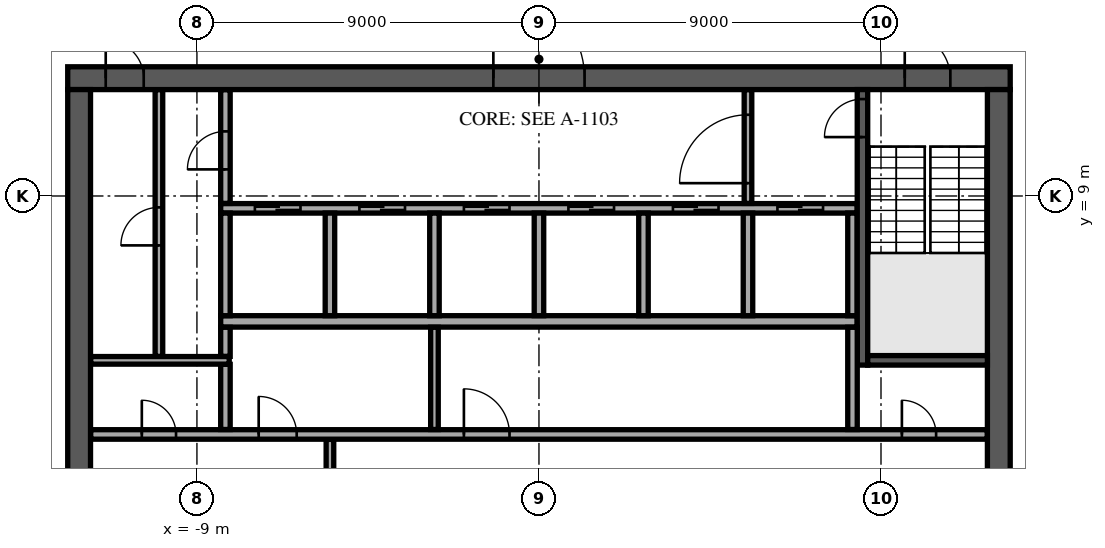
"""IFC4 building model, lengths in metres.
Left out: names, types, materials, properties, quantities, classifications, styles, units other than length and angle.
Written with IfcOpenShell. Run it as: python <this file> out.ifc"""

import sys

from ifc_helpers import new_model, si_unit, direction, frame, frame_2d, origin, place, context, subcontext, project, spatial, rectangle, extrude, element, fill, save


model = new_model("IFC4")
c1 = context("Model", 3, precision=1e-05, world=origin(), true_north=direction((0.0, 1.0)))
c2 = subcontext(c1, "Body", "Model", "MODEL_VIEW")
j1 = project(units=[si_unit("LENGTHUNIT", "METRE"), si_unit("PLANEANGLEUNIT", "RADIAN")], contexts=[c1])
p1 = place(None, origin())
s1 = spatial("IfcSite", under=j1, at=p1, CompositionType="ELEMENT")
p2 = place(p1, origin())
s2 = spatial("IfcBuilding", under=s1, at=p2, CompositionType="ELEMENT")
p3 = place(p2, frame((0.0, 0.0, 300.5)))
s3 = spatial("IfcBuildingStorey", under=s2, at=p3, CompositionType="ELEMENT", Elevation=300.5)
p4 = place(p3, frame((-12.4, 12.1, 0.0), z_axis=(0.0, 0.0, 1.0), x_axis=(1.0, 0.0, 0.0)))
e1 = element("IfcWall", 1, at=p4, inside=s3, PredefinedType="SHEAR", context=c2, shape_type="SweptSolid", body=[
    extrude(rectangle(XDim=24.8, YDim=0.6, at=frame_2d((12.4, 0.0))), origin(), (0.0, 0.0, 1.0), 3.65),
])
p5 = place(p4, frame((11.2, 0.0, 0.0)))
e2 = element("IfcOpeningElement", 2, at=p5, cuts=e1, PredefinedType="OPENING", context=c2, shape_type="SweptSolid", body=[
    extrude(rectangle(XDim=2.4, YDim=2.4, at=frame_2d((1.2, 1.2))), frame((0.0, 0.31, 0.0), z_axis=(0.0, -1.0, 0.0), x_axis=(1.0, 0.0, 0.0)), (0.0, 0.0, 1.0), 0.62),
])
p6 = place(p4, frame((22.025, 0.0, 0.0)))
e3 = element("IfcOpeningElement", 3, at=p6, cuts=e1, PredefinedType="OPENING", context=c2, shape_type="SweptSolid", body=[
    extrude(rectangle(XDim=1.2, YDim=2.1, at=frame_2d((0.6, 1.05))), frame((0.0, 0.31, 0.0), z_axis=(0.0, -1.0, 0.0), x_axis=(1.0, 0.0, 0.0)), (0.0, 0.0, 1.0), 0.62),
])
p7 = place(p4, frame((1.0, 0.0, 0.0)))
e4 = element("IfcOpeningElement", 4, at=p7, cuts=e1, PredefinedType="OPENING", context=c2, shape_type="SweptSolid", body=[
    extrude(rectangle(XDim=1.0, YDim=2.1, at=frame_2d((0.5, 1.05))), frame((0.0, 0.31, 0.0), z_axis=(0.0, -1.0, 0.0), x_axis=(1.0, 0.0, 0.0)), (0.0, 0.0, 1.0), 0.62),
])
p8 = place(p3, frame((12.1, -11.8, 0.0), z_axis=(0.0, 0.0, 1.0), x_axis=(0.0, 1.0, 0.0)))
e5 = element("IfcWall", 5, at=p8, inside=s3, PredefinedType="SHEAR", context=c2, shape_type="SweptSolid", body=[
    extrude(rectangle(XDim=23.6, YDim=0.6, at=frame_2d((11.8, 0.0))), origin(), (0.0, 0.0, 1.0), 3.65),
])
p9 = place(p8, frame((10.6, 0.0, 0.0)))
e6 = element("IfcOpeningElement", 6, at=p9, cuts=e5, PredefinedType="OPENING", context=c2, shape_type="SweptSolid", body=[
    extrude(rectangle(XDim=2.4, YDim=2.4, at=frame_2d((1.2, 1.2))), frame((0.0, 0.31, 0.0), z_axis=(0.0, -1.0, 0.0), x_axis=(1.0, 0.0, 0.0)), (0.0, 0.0, 1.0), 0.62),
])
p10 = place(p3, frame((-12.1, -11.8, 0.0), z_axis=(0.0, 0.0, 1.0), x_axis=(0.0, 1.0, 0.0)))
e7 = element("IfcWall", 7, at=p10, inside=s3, PredefinedType="SHEAR", context=c2, shape_type="SweptSolid", body=[
    extrude(rectangle(XDim=23.6, YDim=0.6, at=frame_2d((11.8, 0.0))), origin(), (0.0, 0.0, 1.0), 3.65),
])
p11 = place(p10, frame((10.6, 0.0, 0.0)))
e8 = element("IfcOpeningElement", 8, at=p11, cuts=e7, PredefinedType="OPENING", context=c2, shape_type="SweptSolid", body=[
    extrude(rectangle(XDim=2.4, YDim=2.4, at=frame_2d((1.2, 1.2))), frame((0.0, 0.31, 0.0), z_axis=(0.0, -1.0, 0.0), x_axis=(1.0, 0.0, 0.0)), (0.0, 0.0, 1.0), 0.62),
])
p12 = place(p3, frame((-8.375, 5.7, 0.0), z_axis=(0.0, 0.0, 1.0), x_axis=(1.0, 0.0, 0.0)))
e9 = element("IfcWall", 9, at=p12, inside=s3, PredefinedType="SOLIDWALL", context=c2, shape_type="SweptSolid", body=[
    extrude(rectangle(XDim=16.75, YDim=0.3, at=frame_2d((8.375, 0.0))), origin(), (0.0, 0.0, 1.0), 3.65),
])
p13 = place(p3, frame((-8.375, 8.675, 0.0), z_axis=(0.0, 0.0, 1.0), x_axis=(1.0, 0.0, 0.0)))
e10 = element("IfcWall", 10, at=p13, inside=s3, PredefinedType="SOLIDWALL", context=c2, shape_type="SweptSolid", body=[
    extrude(rectangle(XDim=16.75, YDim=0.25, at=frame_2d((8.375, 0.0))), origin(), (0.0, 0.0, 1.0), 3.65),
])
p14 = place(p13, frame((0.9, 0.0, 0.0)))
e11 = element("IfcOpeningElement", 11, at=p14, cuts=e10, PredefinedType="OPENING", context=c2, shape_type="SweptSolid", body=[
    extrude(rectangle(XDim=1.2, YDim=2.1, at=frame_2d((0.6, 1.05))), frame((0.0, 0.135, 0.0), z_axis=(0.0, -1.0, 0.0), x_axis=(1.0, 0.0, 0.0)), (0.0, 0.0, 1.0), 0.27),
])
p15 = place(p13, frame((3.65, 0.0, 0.0)))
e12 = element("IfcOpeningElement", 12, at=p15, cuts=e10, PredefinedType="OPENING", context=c2, shape_type="SweptSolid", body=[
    extrude(rectangle(XDim=1.2, YDim=2.1, at=frame_2d((0.6, 1.05))), frame((0.0, 0.135, 0.0), z_axis=(0.0, -1.0, 0.0), x_axis=(1.0, 0.0, 0.0)), (0.0, 0.0, 1.0), 0.27),
])
p16 = place(p13, frame((6.4, 0.0, 0.0)))
e13 = element("IfcOpeningElement", 13, at=p16, cuts=e10, PredefinedType="OPENING", context=c2, shape_type="SweptSolid", body=[
    extrude(rectangle(XDim=1.2, YDim=2.1, at=frame_2d((0.6, 1.05))), frame((0.0, 0.135, 0.0), z_axis=(0.0, -1.0, 0.0), x_axis=(1.0, 0.0, 0.0)), (0.0, 0.0, 1.0), 0.27),
])
p17 = place(p13, frame((9.15, 0.0, 0.0)))
e14 = element("IfcOpeningElement", 14, at=p17, cuts=e10, PredefinedType="OPENING", context=c2, shape_type="SweptSolid", body=[
    extrude(rectangle(XDim=1.2, YDim=2.1, at=frame_2d((0.6, 1.05))), frame((0.0, 0.135, 0.0), z_axis=(0.0, -1.0, 0.0), x_axis=(1.0, 0.0, 0.0)), (0.0, 0.0, 1.0), 0.27),
])
p18 = place(p13, frame((11.9, 0.0, 0.0)))
e15 = element("IfcOpeningElement", 15, at=p18, cuts=e10, PredefinedType="OPENING", context=c2, shape_type="SweptSolid", body=[
    extrude(rectangle(XDim=1.2, YDim=2.1, at=frame_2d((0.6, 1.05))), frame((0.0, 0.135, 0.0), z_axis=(0.0, -1.0, 0.0), x_axis=(1.0, 0.0, 0.0)), (0.0, 0.0, 1.0), 0.27),
])
p19 = place(p13, frame((14.65, 0.0, 0.0)))
e16 = element("IfcOpeningElement", 16, at=p19, cuts=e10, PredefinedType="OPENING", context=c2, shape_type="SweptSolid", body=[
    extrude(rectangle(XDim=1.2, YDim=2.1, at=frame_2d((0.6, 1.05))), frame((0.0, 0.135, 0.0), z_axis=(0.0, -1.0, 0.0), x_axis=(1.0, 0.0, 0.0)), (0.0, 0.0, 1.0), 0.27),
])
for number, where, z_axis, x_axis in (
    (17, (-8.25, 5.85, 0.0), (0.0, 0.0, 1.0), (0.0, 1.0, 0.0)),
    (18, (-5.5, 5.85, 0.0), (0.0, 0.0, 1.0), (0.0, 1.0, 0.0)),
    (19, (-2.75, 5.85, 0.0), (0.0, 0.0, 1.0), (0.0, 1.0, 0.0)),
    (20, (0.0, 5.85, 0.0), (0.0, 0.0, 1.0), (0.0, 1.0, 0.0)),
    (21, (2.75, 5.85, 0.0), (0.0, 0.0, 1.0), (0.0, 1.0, 0.0)),
    (22, (5.5, 5.85, 0.0), (0.0, 0.0, 1.0), (0.0, 1.0, 0.0)),
    (23, (8.25, 5.85, 0.0), (0.0, 0.0, 1.0), (0.0, 1.0, 0.0)),
):
    element("IfcWall", number, at=place(p3, frame(where, z_axis=z_axis, x_axis=x_axis)), inside=s3, PredefinedType="SOLIDWALL", context=c2, shape_type="SweptSolid", body=[
        extrude(rectangle(XDim=2.7, YDim=0.25, at=frame_2d((1.35, 0.0))), origin(), (0.0, 0.0, 1.0), 3.65),
    ])
p20 = place(p3, frame((8.512, 4.55, 0.0), z_axis=(0.0, 0.0, 1.0), x_axis=(0.0, 1.0, 0.0)))
e24 = element("IfcWall", 24, at=p20, inside=s3, PredefinedType="SOLIDWALL", context=c2, shape_type="SweptSolid", body=[
    extrude(rectangle(XDim=7.25, YDim=0.275, at=frame_2d((3.625, 0.0))), origin(), (0.0, 0.0, 1.0), 3.65),
])
p21 = place(p20, frame((6.0, 0.0, 0.0)))
e25 = element("IfcOpeningElement", 25, at=p21, cuts=e24, PredefinedType="OPENING", context=c2, shape_type="SweptSolid", body=[
    extrude(rectangle(XDim=1.0, YDim=2.1, at=frame_2d((0.5, 1.05))), frame((0.0, 0.147, 0.0), z_axis=(0.0, -1.0, 0.0), x_axis=(1.0, 0.0, 0.0)), (0.0, 0.0, 1.0), 0.295),
])
p22 = place(p3, frame((8.65, 4.675, 0.0), z_axis=(0.0, 0.0, 1.0), x_axis=(1.0, 0.0, 0.0)))
e26 = element("IfcWall", 26, at=p22, inside=s3, PredefinedType="SOLIDWALL", context=c2, shape_type="SweptSolid", body=[
    extrude(rectangle(XDim=3.15, YDim=0.25, at=frame_2d((1.575, 0.0))), origin(), (0.0, 0.0, 1.0), 3.65),
])
p23 = place(p3, frame((-5.5, -2.595, 0.0), z_axis=(0.0, 0.0, 1.0), x_axis=(0.0, 1.0, 0.0)))
e27 = element("IfcWall", 27, at=p23, inside=s3, PredefinedType="PARTITIONING", context=c2, shape_type="SweptSolid", body=[
    extrude(rectangle(XDim=5.19, YDim=0.2, at=frame_2d((2.595, 0.0))), origin(), (0.0, 0.0, 1.0), 3.65),
])
p24 = place(p23, frame((1.395, 0.0, 0.0)))
e28 = element("IfcOpeningElement", 28, at=p24, cuts=e27, PredefinedType="OPENING", context=c2, shape_type="SweptSolid", body=[
    extrude(rectangle(XDim=2.4, YDim=2.4, at=frame_2d((1.2, 1.2))), frame((0.0, 0.11, 0.0), z_axis=(0.0, -1.0, 0.0), x_axis=(1.0, 0.0, 0.0)), (0.0, 0.0, 1.0), 0.22),
])
p25 = place(p3, frame((-11.795, 2.725, 0.0), z_axis=(0.0, 0.0, 1.0), x_axis=(1.0, 0.0, 0.0)))
e29 = element("IfcWall", 29, at=p25, inside=s3, PredefinedType="PARTITIONING", context=c2, shape_type="SweptSolid", body=[
    extrude(rectangle(XDim=23.59, YDim=0.25, at=frame_2d((11.795, 0.0))), origin(), (0.0, 0.0, 1.0), 3.65),
])
p26 = place(p25, frame((21.345, 0.0, 0.0)))
e30 = element("IfcOpeningElement", 30, at=p26, cuts=e29, PredefinedType="OPENING", context=c2, shape_type="SweptSolid", body=[
    extrude(rectangle(XDim=0.9, YDim=2.1, at=frame_2d((0.45, 1.05))), frame((0.0, 0.135, 0.0), z_axis=(0.0, -1.0, 0.0), x_axis=(1.0, 0.0, 0.0)), (0.0, 0.0, 1.0), 0.27),
])
p27 = place(p25, frame((1.345, 0.0, 0.0)))
e31 = element("IfcOpeningElement", 31, at=p27, cuts=e29, PredefinedType="OPENING", context=c2, shape_type="SweptSolid", body=[
    extrude(rectangle(XDim=0.9, YDim=2.1, at=frame_2d((0.45, 1.05))), frame((0.0, 0.135, 0.0), z_axis=(0.0, -1.0, 0.0), x_axis=(1.0, 0.0, 0.0)), (0.0, 0.0, 1.0), 0.27),
])
p28 = place(p25, frame((4.42, 0.0, 0.0)))
e32 = element("IfcOpeningElement", 32, at=p28, cuts=e29, PredefinedType="OPENING", context=c2, shape_type="SweptSolid", body=[
    extrude(rectangle(XDim=1.0, YDim=2.1, at=frame_2d((0.5, 1.05))), frame((0.0, 0.135, 0.0), z_axis=(0.0, -1.0, 0.0), x_axis=(1.0, 0.0, 0.0)), (0.0, 0.0, 1.0), 0.27),
])
p29 = place(p25, frame((9.82, 0.0, 0.0)))
e33 = element("IfcOpeningElement", 33, at=p29, cuts=e29, PredefinedType="OPENING", context=c2, shape_type="SweptSolid", body=[
    extrude(rectangle(XDim=1.2, YDim=2.1, at=frame_2d((0.6, 1.05))), frame((0.0, 0.135, 0.0), z_axis=(0.0, -1.0, 0.0), x_axis=(1.0, 0.0, 0.0)), (0.0, 0.0, 1.0), 0.27),
])
p30 = place(p3, frame((-8.25, 2.855, 0.0), z_axis=(0.0, 0.0, 1.0), x_axis=(0.0, 1.0, 0.0)))
e34 = element("IfcWall", 34, at=p30, inside=s3, PredefinedType="PARTITIONING", context=c2, shape_type="SweptSolid", body=[
    extrude(rectangle(XDim=1.715, YDim=0.25, at=frame_2d((0.857, 0.0))), origin(), (0.0, 0.0, 1.0), 3.65),
])
p31 = place(p3, frame((-2.75, 2.855, 0.0), z_axis=(0.0, 0.0, 1.0), x_axis=(0.0, 1.0, 0.0)))
e35 = element("IfcWall", 35, at=p31, inside=s3, PredefinedType="PARTITIONING", context=c2, shape_type="SweptSolid", body=[
    extrude(rectangle(XDim=2.69, YDim=0.2, at=frame_2d((1.345, 0.0))), origin(), (0.0, 0.0, 1.0), 3.65),
])
p32 = place(p3, frame((8.25, 2.855, 0.0), z_axis=(0.0, 0.0, 1.0), x_axis=(0.0, 1.0, 0.0)))
e36 = element("IfcWall", 36, at=p32, inside=s3, PredefinedType="PARTITIONING", context=c2, shape_type="SweptSolid", body=[
    extrude(rectangle(XDim=2.69, YDim=0.25, at=frame_2d((1.345, 0.0))), origin(), (0.0, 0.0, 1.0), 3.65),
])
p33 = place(p3, frame((-11.795, 4.675, 0.0), z_axis=(0.0, 0.0, 1.0), x_axis=(1.0, 0.0, 0.0)))
e37 = element("IfcWall", 37, at=p33, inside=s3, PredefinedType="PARTITIONING", context=c2, shape_type="SweptSolid", body=[
    extrude(rectangle(XDim=3.645, YDim=0.2, at=frame_2d((1.823, 0.0))), origin(), (0.0, 0.0, 1.0), 3.65),
])
p34 = place(p3, frame((-10.0, 4.78, 0.0), z_axis=(0.0, 0.0, 1.0), x_axis=(0.0, 1.0, 0.0)))
e38 = element("IfcWall", 38, at=p34, inside=s3, PredefinedType="PARTITIONING", context=c2, shape_type="SweptSolid", body=[
    extrude(rectangle(XDim=7.015, YDim=0.2, at=frame_2d((3.507, 0.0))), origin(), (0.0, 0.0, 1.0), 3.65),
])
p35 = place(p34, frame((2.92, 0.0, 0.0)))
e39 = element("IfcOpeningElement", 39, at=p35, cuts=e38, PredefinedType="OPENING", context=c2, shape_type="SweptSolid", body=[
    extrude(rectangle(XDim=1.0, YDim=2.1, at=frame_2d((0.5, 1.05))), frame((0.0, 0.11, 0.0), z_axis=(0.0, -1.0, 0.0), x_axis=(1.0, 0.0, 0.0)), (0.0, 0.0, 1.0), 0.22),
])
p36 = place(p3, frame((-8.25, 4.78, 0.0), z_axis=(0.0, 0.0, 1.0), x_axis=(0.0, 1.0, 0.0)))
e40 = element("IfcWall", 40, at=p36, inside=s3, PredefinedType="PARTITIONING", context=c2, shape_type="SweptSolid", body=[
    extrude(rectangle(XDim=0.765, YDim=0.25, at=frame_2d((0.382, 0.0))), origin(), (0.0, 0.0, 1.0), 3.65),
])
p37 = place(p3, frame((-8.25, 8.805, 0.0), z_axis=(0.0, 0.0, 1.0), x_axis=(0.0, 1.0, 0.0)))
e41 = element("IfcWall", 41, at=p37, inside=s3, PredefinedType="PARTITIONING", context=c2, shape_type="SweptSolid", body=[
    extrude(rectangle(XDim=2.99, YDim=0.25, at=frame_2d((1.495, 0.0))), origin(), (0.0, 0.0, 1.0), 3.65),
])
p38 = place(p37, frame((0.895, 0.0, 0.0)))
e42 = element("IfcOpeningElement", 42, at=p38, cuts=e41, PredefinedType="OPENING", context=c2, shape_type="SweptSolid", body=[
    extrude(rectangle(XDim=1.0, YDim=2.1, at=frame_2d((0.5, 1.05))), frame((0.0, 0.135, 0.0), z_axis=(0.0, -1.0, 0.0), x_axis=(1.0, 0.0, 0.0)), (0.0, 0.0, 1.0), 0.27),
])
p39 = place(p3, frame((5.5, 8.805, 0.0), z_axis=(0.0, 0.0, 1.0), x_axis=(0.0, 1.0, 0.0)))
e43 = element("IfcWall", 43, at=p39, inside=s3, PredefinedType="PARTITIONING", context=c2, shape_type="SweptSolid", body=[
    extrude(rectangle(XDim=2.99, YDim=0.2, at=frame_2d((1.495, 0.0))), origin(), (0.0, 0.0, 1.0), 3.65),
])
p40 = place(p39, frame((0.532, 0.0, 0.0)))
e44 = element("IfcOpeningElement", 44, at=p40, cuts=e43, PredefinedType="OPENING", context=c2, shape_type="SweptSolid", body=[
    extrude(rectangle(XDim=1.8, YDim=2.1, at=frame_2d((0.9, 1.05))), frame((0.0, 0.11, 0.0), z_axis=(0.0, -1.0, 0.0), x_axis=(1.0, 0.0, 0.0)), (0.0, 0.0, 1.0), 0.22),
])
p41 = place(p3, frame((-8.176, 25.325, 0.0), z_axis=(0.0, 0.0, 1.0), x_axis=(0.920507643781, -0.390724554821, 0.0)))
e45 = element("IfcWall", 45, at=p41, inside=s3, PredefinedType="PARTITIONING", context=c2, shape_type="SweptSolid", body=[
    extrude(rectangle(XDim=34.917, YDim=0.15, at=frame_2d((17.458, 0.0))), origin(), (0.0, 0.0, 1.0), 3.25),
])
p42 = place(p41, frame((5.55, 0.0, 0.0)))
e46 = element("IfcOpeningElement", 46, at=p42, cuts=e45, PredefinedType="OPENING", context=c2, shape_type="SweptSolid", body=[
    extrude(rectangle(XDim=1.8, YDim=2.1, at=frame_2d((0.9, 1.05))), frame((0.0, 0.085, 0.0), z_axis=(0.0, -1.0, 0.0), x_axis=(1.0, 0.0, 0.0)), (0.0, 0.0, 1.0), 0.17),
])
p43 = place(p41, frame((1.05, 0.0, 0.0)))
e47 = element("IfcOpeningElement", 47, at=p43, cuts=e45, PredefinedType="OPENING", context=c2, shape_type="SweptSolid", body=[
    extrude(rectangle(XDim=1.0, YDim=2.1, at=frame_2d((0.5, 1.05))), frame((0.0, 0.085, 0.0), z_axis=(0.0, -1.0, 0.0), x_axis=(1.0, 0.0, 0.0)), (0.0, 0.0, 1.0), 0.17),
])
p44 = place(p41, frame((16.098, 0.0, 0.0)))
e48 = element("IfcOpeningElement", 48, at=p44, cuts=e45, PredefinedType="OPENING", context=c2, shape_type="SweptSolid", body=[
    extrude(rectangle(XDim=1.0, YDim=2.1, at=frame_2d((0.5, 1.05))), frame((0.0, 0.085, 0.0), z_axis=(0.0, -1.0, 0.0), x_axis=(1.0, 0.0, 0.0)), (0.0, 0.0, 1.0), 0.17),
])
p45 = place(p41, frame((23.547, 0.0, 0.0)))
e49 = element("IfcOpeningElement", 49, at=p45, cuts=e45, PredefinedType="OPENING", context=c2, shape_type="SweptSolid", body=[
    extrude(rectangle(XDim=1.0, YDim=2.1, at=frame_2d((0.5, 1.05))), frame((0.0, 0.085, 0.0), z_axis=(0.0, -1.0, 0.0), x_axis=(1.0, 0.0, 0.0)), (0.0, 0.0, 1.0), 0.17),
])
p46 = place(p5, origin())
e50 = element("IfcDoor", 50, at=p46, inside=s3, OperationType="SINGLE_SWING_LEFT", PredefinedType="DOOR", context=c2, shape_type="SweptSolid", body=[
    extrude(rectangle(XDim=2.4, YDim=2.4, at=frame_2d((1.2, 1.2))), frame((0.0, 0.025, 0.0), z_axis=(0.0, -1.0, 0.0), x_axis=(1.0, 0.0, 0.0)), (0.0, 0.0, 1.0), 0.05),
])
fill(e2, e50)
p47 = place(p6, origin())
e51 = element("IfcDoor", 51, at=p47, inside=s3, OperationType="SINGLE_SWING_LEFT", PredefinedType="DOOR", context=c2, shape_type="SweptSolid", body=[
    extrude(rectangle(XDim=1.2, YDim=2.1, at=frame_2d((0.6, 1.05))), frame((0.0, 0.025, 0.0), z_axis=(0.0, -1.0, 0.0), x_axis=(1.0, 0.0, 0.0)), (0.0, 0.0, 1.0), 0.05),
])
fill(e3, e51)
p48 = place(p7, origin())
e52 = element("IfcDoor", 52, at=p48, inside=s3, OperationType="SINGLE_SWING_LEFT", PredefinedType="DOOR", context=c2, shape_type="SweptSolid", body=[
    extrude(rectangle(XDim=1.0, YDim=2.1, at=frame_2d((0.5, 1.05))), frame((0.0, 0.025, 0.0), z_axis=(0.0, -1.0, 0.0), x_axis=(1.0, 0.0, 0.0)), (0.0, 0.0, 1.0), 0.05),
])
fill(e4, e52)
p49 = place(p14, origin())
e53 = element("IfcDoor", 53, at=p49, inside=s3, OperationType="DOUBLE_DOOR_SLIDING", PredefinedType="DOOR", context=c2, shape_type="SweptSolid", body=[
    extrude(rectangle(XDim=1.2, YDim=2.1, at=frame_2d((0.6, 1.05))), frame((0.0, 0.025, 0.0), z_axis=(0.0, -1.0, 0.0), x_axis=(1.0, 0.0, 0.0)), (0.0, 0.0, 1.0), 0.05),
])
fill(e11, e53)
p50 = place(p15, origin())
e54 = element("IfcDoor", 54, at=p50, inside=s3, OperationType="DOUBLE_DOOR_SLIDING", PredefinedType="DOOR", context=c2, shape_type="SweptSolid", body=[
    extrude(rectangle(XDim=1.2, YDim=2.1, at=frame_2d((0.6, 1.05))), frame((0.0, 0.025, 0.0), z_axis=(0.0, -1.0, 0.0), x_axis=(1.0, 0.0, 0.0)), (0.0, 0.0, 1.0), 0.05),
])
fill(e12, e54)
p51 = place(p16, origin())
e55 = element("IfcDoor", 55, at=p51, inside=s3, OperationType="DOUBLE_DOOR_SLIDING", PredefinedType="DOOR", context=c2, shape_type="SweptSolid", body=[
    extrude(rectangle(XDim=1.2, YDim=2.1, at=frame_2d((0.6, 1.05))), frame((0.0, 0.025, 0.0), z_axis=(0.0, -1.0, 0.0), x_axis=(1.0, 0.0, 0.0)), (0.0, 0.0, 1.0), 0.05),
])
fill(e13, e55)
p52 = place(p17, origin())
e56 = element("IfcDoor", 56, at=p52, inside=s3, OperationType="DOUBLE_DOOR_SLIDING", PredefinedType="DOOR", context=c2, shape_type="SweptSolid", body=[
    extrude(rectangle(XDim=1.2, YDim=2.1, at=frame_2d((0.6, 1.05))), frame((0.0, 0.025, 0.0), z_axis=(0.0, -1.0, 0.0), x_axis=(1.0, 0.0, 0.0)), (0.0, 0.0, 1.0), 0.05),
])
fill(e14, e56)
p53 = place(p18, origin())
e57 = element("IfcDoor", 57, at=p53, inside=s3, OperationType="DOUBLE_DOOR_SLIDING", PredefinedType="DOOR", context=c2, shape_type="SweptSolid", body=[
    extrude(rectangle(XDim=1.2, YDim=2.1, at=frame_2d((0.6, 1.05))), frame((0.0, 0.025, 0.0), z_axis=(0.0, -1.0, 0.0), x_axis=(1.0, 0.0, 0.0)), (0.0, 0.0, 1.0), 0.05),
])
fill(e15, e57)
p54 = place(p19, origin())
e58 = element("IfcDoor", 58, at=p54, inside=s3, OperationType="DOUBLE_DOOR_SLIDING", PredefinedType="DOOR", context=c2, shape_type="SweptSolid", body=[
    extrude(rectangle(XDim=1.2, YDim=2.1, at=frame_2d((0.6, 1.05))), frame((0.0, 0.025, 0.0), z_axis=(0.0, -1.0, 0.0), x_axis=(1.0, 0.0, 0.0)), (0.0, 0.0, 1.0), 0.05),
])
fill(e16, e58)
p55 = place(p21, origin())
e59 = element("IfcDoor", 59, at=p55, inside=s3, OperationType="SINGLE_SWING_LEFT", PredefinedType="DOOR", context=c2, shape_type="SweptSolid", body=[
    extrude(rectangle(XDim=1.0, YDim=2.1, at=frame_2d((0.5, 1.05))), frame((0.0, 0.025, 0.0), z_axis=(0.0, -1.0, 0.0), x_axis=(1.0, 0.0, 0.0)), (0.0, 0.0, 1.0), 0.05),
])
fill(e25, e59)
p56 = place(p26, origin())
e60 = element("IfcDoor", 60, at=p56, inside=s3, OperationType="SINGLE_SWING_RIGHT", PredefinedType="DOOR", context=c2, shape_type="SweptSolid", body=[
    extrude(rectangle(XDim=0.9, YDim=2.1, at=frame_2d((0.45, 1.05))), frame((0.0, 0.025, 0.0), z_axis=(0.0, -1.0, 0.0), x_axis=(1.0, 0.0, 0.0)), (0.0, 0.0, 1.0), 0.05),
])
fill(e30, e60)
p57 = place(p27, origin())
e61 = element("IfcDoor", 61, at=p57, inside=s3, OperationType="SINGLE_SWING_RIGHT", PredefinedType="DOOR", context=c2, shape_type="SweptSolid", body=[
    extrude(rectangle(XDim=0.9, YDim=2.1, at=frame_2d((0.45, 1.05))), frame((0.0, 0.025, 0.0), z_axis=(0.0, -1.0, 0.0), x_axis=(1.0, 0.0, 0.0)), (0.0, 0.0, 1.0), 0.05),
])
fill(e31, e61)
p58 = place(p35, origin())
e62 = element("IfcDoor", 62, at=p58, inside=s3, OperationType="SINGLE_SWING_RIGHT", PredefinedType="DOOR", context=c2, shape_type="SweptSolid", body=[
    extrude(rectangle(XDim=1.0, YDim=2.1, at=frame_2d((0.5, 1.05))), frame((0.0, 0.025, 0.0), z_axis=(0.0, -1.0, 0.0), x_axis=(1.0, 0.0, 0.0)), (0.0, 0.0, 1.0), 0.05),
])
fill(e39, e62)
p59 = place(p38, origin())
e63 = element("IfcDoor", 63, at=p59, inside=s3, OperationType="SINGLE_SWING_RIGHT", PredefinedType="DOOR", context=c2, shape_type="SweptSolid", body=[
    extrude(rectangle(XDim=1.0, YDim=2.1, at=frame_2d((0.5, 1.05))), frame((0.0, 0.025, 0.0), z_axis=(0.0, -1.0, 0.0), x_axis=(1.0, 0.0, 0.0)), (0.0, 0.0, 1.0), 0.05),
])
fill(e42, e63)
p60 = place(p28, origin())
e64 = element("IfcDoor", 64, at=p60, inside=s3, OperationType="SINGLE_SWING_RIGHT", PredefinedType="DOOR", context=c2, shape_type="SweptSolid", body=[
    extrude(rectangle(XDim=1.0, YDim=2.1, at=frame_2d((0.5, 1.05))), frame((0.0, 0.025, 0.0), z_axis=(0.0, -1.0, 0.0), x_axis=(1.0, 0.0, 0.0)), (0.0, 0.0, 1.0), 0.05),
])
fill(e32, e64)
p61 = place(p29, origin())
e65 = element("IfcDoor", 65, at=p61, inside=s3, OperationType="SINGLE_SWING_LEFT", PredefinedType="DOOR", context=c2, shape_type="SweptSolid", body=[
    extrude(rectangle(XDim=1.2, YDim=2.1, at=frame_2d((0.6, 1.05))), frame((0.0, 0.025, 0.0), z_axis=(0.0, -1.0, 0.0), x_axis=(1.0, 0.0, 0.0)), (0.0, 0.0, 1.0), 0.05),
])
fill(e33, e65)
p62 = place(p40, origin())
e66 = element("IfcDoor", 66, at=p62, inside=s3, OperationType="SINGLE_SWING_LEFT", PredefinedType="DOOR", context=c2, shape_type="SweptSolid", body=[
    extrude(rectangle(XDim=1.8, YDim=2.1, at=frame_2d((0.9, 1.05))), frame((0.0, 0.025, 0.0), z_axis=(0.0, -1.0, 0.0), x_axis=(1.0, 0.0, 0.0)), (0.0, 0.0, 1.0), 0.05),
])
fill(e44, e66)
save(model, sys.argv[1])
